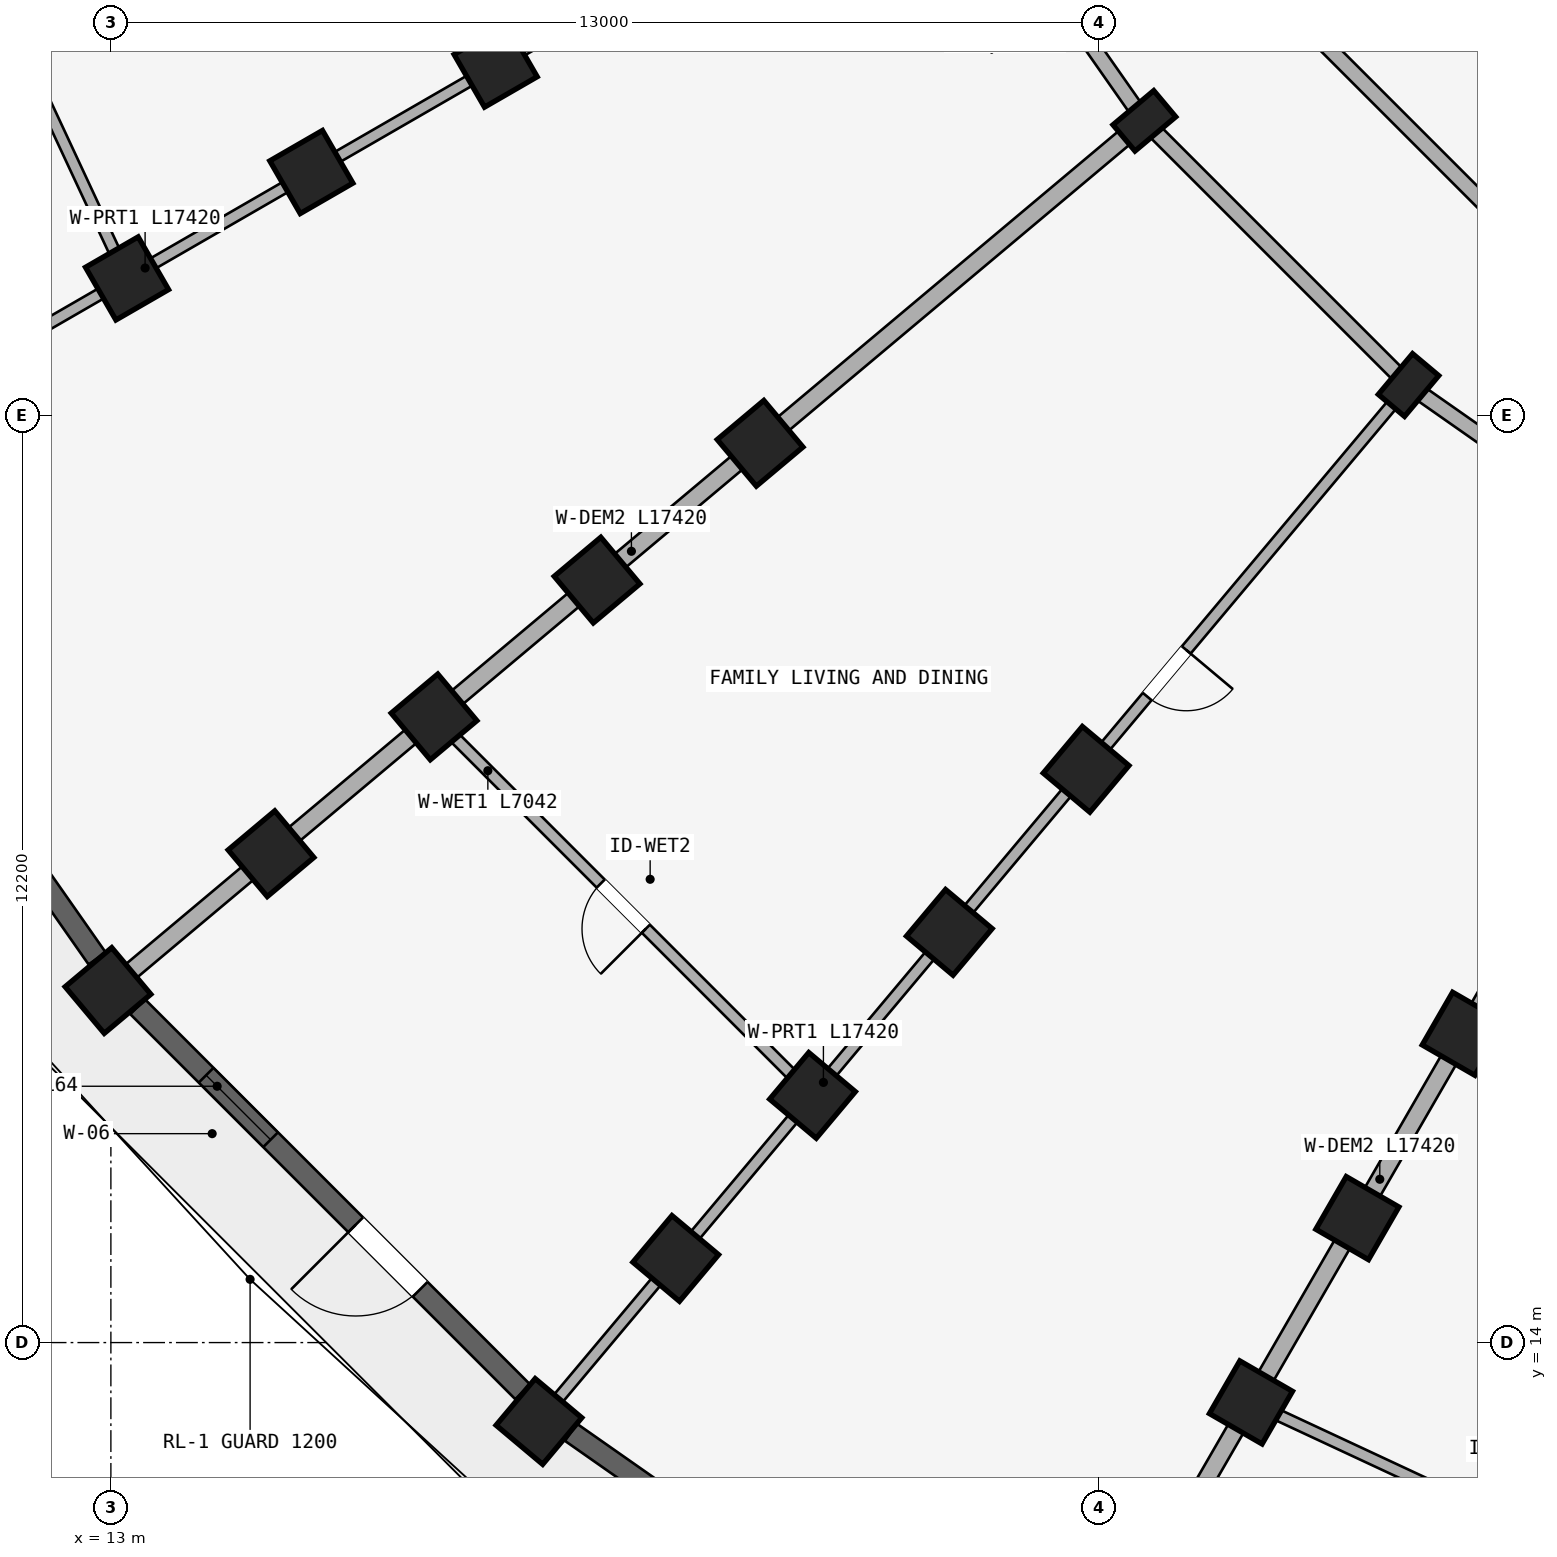
"""IFC4 building model, lengths in metres.
Left out: names, types, materials, properties, quantities, classifications, styles, units other than length and angle.
Written with IfcOpenShell. Run it as: python <this file> out.ifc"""

import sys

from ifc_helpers import new_model, si_unit, direction, frame, frame_2d, origin, origin_2d, place, context, subcontext, project, spatial, rectangle, extrude, element, fill, save


model = new_model("IFC4")
c1 = context("Model", 3, precision=1e-05, world=origin(), true_north=direction((0.0, 1.0)))
c2 = subcontext(c1, "Body", "Model", "MODEL_VIEW")
j1 = project(units=[si_unit("LENGTHUNIT", "METRE"), si_unit("PLANEANGLEUNIT", "RADIAN")], contexts=[c1])
p1 = place(None, origin())
s1 = spatial("IfcSite", under=j1, at=p1, CompositionType="ELEMENT")
p2 = place(p1, origin())
s2 = spatial("IfcBuilding", under=s1, at=p2, CompositionType="ELEMENT")
p3 = place(p2, frame((0.0, 0.0, 11.85)))
s3 = spatial("IfcBuildingStorey", under=s2, at=p3, CompositionType="ELEMENT", Elevation=11.85)
for number, where, z_axis, x_axis in (
    (1, (30.8, 18.062, 0.0), (0.0, 0.0, 1.0), (-0.866, 0.5, 0.0)),
    (2, (29.4, 15.637, 0.0), (0.0, 0.0, 1.0), (-0.866, 0.5, 0.0)),
    (3, (28.0, 13.213, 0.0), (0.0, 0.0, 1.0), (-0.866, 0.5, 0.0)),
):
    element("IfcColumn", number, at=place(p3, frame(where, z_axis=z_axis, x_axis=x_axis)), inside=s3, PredefinedType="COLUMN", context=c2, shape_type="SweptSolid", body=[
        extrude(rectangle(XDim=0.8, YDim=0.8, at=origin_2d()), origin(), (0.0, 0.0, 1.0), 2.93),
    ])
p4 = place(p3, frame((30.073, 26.598, 0.0), z_axis=(0.0, 0.0, 1.0), x_axis=(-0.766044443119, 0.642787609687, 0.0)))
e4 = element("IfcColumn", 4, at=p4, inside=s3, PredefinedType="COLUMN", context=c2, shape_type="SweptSolid", body=[
    extrude(rectangle(XDim=0.45, YDim=0.7, at=origin_2d()), origin(), (0.0, 0.0, 1.0), 2.93),
])
for number, where, z_axis, x_axis in (
    (5, (25.831, 21.542, 0.0), (0.0, 0.0, 1.0), (-0.766, 0.643, 0.0)),
    (6, (24.031, 19.397, 0.0), (0.0, 0.0, 1.0), (-0.766, 0.643, 0.0)),
    (7, (22.231, 17.252, 0.0), (0.0, 0.0, 1.0), (-0.766, 0.643, 0.0)),
    (8, (20.432, 15.107, 0.0), (0.0, 0.0, 1.0), (-0.766, 0.643, 0.0)),
    (9, (18.632, 12.962, 0.0), (0.0, 0.0, 1.0), (-0.766, 0.643, 0.0)),
):
    element("IfcColumn", number, at=place(p3, frame(where, z_axis=z_axis, x_axis=x_axis)), inside=s3, PredefinedType="COLUMN", context=c2, shape_type="SweptSolid", body=[
        extrude(rectangle(XDim=0.8, YDim=0.8, at=origin_2d()), origin(), (0.0, 0.0, 1.0), 2.93),
    ])
p5 = place(p3, frame((26.598, 30.073, 0.0), z_axis=(0.0, 0.0, 1.0), x_axis=(-0.642787609687, 0.766044443119, 0.0)))
e10 = element("IfcColumn", 10, at=p5, inside=s3, PredefinedType="COLUMN", context=c2, shape_type="SweptSolid", body=[
    extrude(rectangle(XDim=0.45, YDim=0.7, at=origin_2d()), origin(), (0.0, 0.0, 1.0), 2.93),
])
for number, where, z_axis, x_axis in (
    (11, (21.542, 25.831, 0.0), (0.0, 0.0, 1.0), (-0.643, 0.766, 0.0)),
    (12, (19.397, 24.031, 0.0), (0.0, 0.0, 1.0), (-0.643, 0.766, 0.0)),
    (13, (17.252, 22.231, 0.0), (0.0, 0.0, 1.0), (-0.643, 0.766, 0.0)),
    (14, (15.107, 20.432, 0.0), (0.0, 0.0, 1.0), (-0.643, 0.766, 0.0)),
    (15, (12.962, 18.632, 0.0), (0.0, 0.0, 1.0), (-0.643, 0.766, 0.0)),
    (16, (18.062, 30.8, 0.0), (0.0, 0.0, 1.0), (-0.5, 0.866, 0.0)),
    (17, (15.637, 29.4, 0.0), (0.0, 0.0, 1.0), (-0.5, 0.866, 0.0)),
    (18, (13.213, 28.0, 0.0), (0.0, 0.0, 1.0), (-0.5, 0.866, 0.0)),
):
    element("IfcColumn", number, at=place(p3, frame(where, z_axis=z_axis, x_axis=x_axis)), inside=s3, PredefinedType="COLUMN", context=c2, shape_type="SweptSolid", body=[
        extrude(rectangle(XDim=0.8, YDim=0.8, at=origin_2d()), origin(), (0.0, 0.0, 1.0), 2.93),
    ])
p6 = place(p3, frame((34.1, 23.778, 0.0), z_axis=(0.0, 0.0, 1.0), x_axis=(-0.819140911474, 0.573592335331, 0.0)))
e19 = element("IfcWall", 19, at=p6, inside=s3, PredefinedType="STANDARD", context=c2, shape_type="SweptSolid", body=[
    extrude(rectangle(XDim=4.916, YDim=0.2, at=frame_2d((2.458, 0.0))), origin(), (0.0, 0.0, 1.0), 2.372),
])
p7 = place(p6, frame((1.918, 0.0, 0.0)))
e20 = element("IfcOpeningElement", 20, at=p7, cuts=e19, PredefinedType="OPENING", context=c2, shape_type="SweptSolid", body=[
    extrude(rectangle(XDim=1.08, YDim=2.15, at=frame_2d((0.54, 1.075))), frame((0.0, 0.11, 0.0), z_axis=(0.0, -1.0, 0.0), x_axis=(1.0, 0.0, 0.0)), (0.0, 0.0, 1.0), 0.22),
])
p8 = place(p3, frame((31.616, 28.436, 0.0), z_axis=(0.0, 0.0, 1.0), x_axis=(-0.707106781187, 0.707106781187, 0.0)))
e21 = element("IfcWall", 21, at=p8, inside=s3, PredefinedType="STANDARD", context=c2, shape_type="SweptSolid", body=[
    extrude(rectangle(XDim=4.497, YDim=0.2, at=frame_2d((2.249, 0.0))), origin(), (0.0, 0.0, 1.0), 2.372),
])
p9 = place(p3, frame((30.073, 26.598, 0.0), z_axis=(0.0, 0.0, 1.0), x_axis=(-0.707106781187, 0.707106781187, 0.0)))
e22 = element("IfcWall", 22, at=p9, inside=s3, PredefinedType="STANDARD", context=c2, shape_type="SweptSolid", body=[
    extrude(rectangle(XDim=4.916, YDim=0.2, at=frame_2d((2.458, 0.0))), origin(), (0.0, 0.0, 1.0), 2.372),
])
p10 = place(p3, frame((26.598, 30.073, 0.0), z_axis=(0.0, 0.0, 1.0), x_axis=(-0.573592335331, 0.819140911474, 0.0)))
e23 = element("IfcWall", 23, at=p10, inside=s3, PredefinedType="STANDARD", context=c2, shape_type="SweptSolid", body=[
    extrude(rectangle(XDim=4.916, YDim=0.2, at=frame_2d((2.458, 0.0))), origin(), (0.0, 0.0, 1.0), 2.372),
])
p11 = place(p10, frame((1.888, 0.0, 0.0)))
e24 = element("IfcOpeningElement", 24, at=p11, cuts=e23, PredefinedType="OPENING", context=c2, shape_type="SweptSolid", body=[
    extrude(rectangle(XDim=1.14, YDim=2.15, at=frame_2d((0.57, 1.075))), frame((0.0, 0.11, 0.0), z_axis=(0.0, -1.0, 0.0), x_axis=(1.0, 0.0, 0.0)), (0.0, 0.0, 1.0), 0.22),
])
p12 = place(p3, frame((34.05, 23.691, 0.0), z_axis=(0.0, 0.0, 1.0), x_axis=(-0.499997843263, -0.866026648973, 0.0)))
e25 = element("IfcWall", 25, at=p12, inside=s3, PredefinedType="STANDARD", context=c2, shape_type="SweptSolid", body=[
    extrude(rectangle(XDim=17.42, YDim=0.23, at=frame_2d((8.71, 0.0))), origin(), (0.0, 0.0, 1.0), 2.372),
])
p13 = place(p3, frame((30.009, 26.521, 0.0), z_axis=(0.0, 0.0, 1.0), x_axis=(-0.642784757967, -0.766046835987, 0.0)))
e26 = element("IfcWall", 26, at=p13, inside=s3, PredefinedType="PARTITIONING", context=c2, shape_type="SweptSolid", body=[
    extrude(rectangle(XDim=17.42, YDim=0.15, at=frame_2d((8.71, 0.0))), origin(), (0.0, 0.0, 1.0), 2.372),
])
p14 = place(p13, frame((4.45, 0.0, 0.0)))
e27 = element("IfcOpeningElement", 27, at=p14, cuts=e26, PredefinedType="OPENING", context=c2, shape_type="SweptSolid", body=[
    extrude(rectangle(XDim=0.8, YDim=2.1, at=frame_2d((0.4, 1.05))), frame((0.0, 0.085, 0.0), z_axis=(0.0, -1.0, 0.0), x_axis=(1.0, 0.0, 0.0)), (0.0, 0.0, 1.0), 0.17),
])
p15 = place(p3, frame((26.521, 30.009, 0.0), z_axis=(0.0, 0.0, 1.0), x_axis=(-0.766046835987, -0.642784757967, 0.0)))
e28 = element("IfcWall", 28, at=p15, inside=s3, PredefinedType="STANDARD", context=c2, shape_type="SweptSolid", body=[
    extrude(rectangle(XDim=17.42, YDim=0.23, at=frame_2d((8.71, 0.0))), origin(), (0.0, 0.0, 1.0), 2.372),
])
p16 = place(p3, frame((23.691, 34.05, 0.0), z_axis=(0.0, 0.0, 1.0), x_axis=(-0.866026648973, -0.499997843263, 0.0)))
e29 = element("IfcWall", 29, at=p16, inside=s3, PredefinedType="PARTITIONING", context=c2, shape_type="SweptSolid", body=[
    extrude(rectangle(XDim=17.42, YDim=0.15, at=frame_2d((8.71, 0.0))), origin(), (0.0, 0.0, 1.0), 2.372),
])
p17 = place(p16, frame((4.45, 0.0, 0.0)))
e30 = element("IfcOpeningElement", 30, at=p17, cuts=e29, PredefinedType="OPENING", context=c2, shape_type="SweptSolid", body=[
    extrude(rectangle(XDim=0.8, YDim=2.1, at=frame_2d((0.4, 1.05))), frame((0.0, 0.085, 0.0), z_axis=(0.0, -1.0, 0.0), x_axis=(1.0, 0.0, 0.0)), (0.0, 0.0, 1.0), 0.17),
])
p18 = place(p3, frame((34.382, 10.236, 0.0), z_axis=(0.0, 0.0, 1.0), x_axis=(-0.906297360311, 0.422640621205, 0.0)))
e31 = element("IfcWall", 31, at=p18, inside=s3, PredefinedType="PLUMBINGWALL", context=c2, shape_type="SweptSolid", body=[
    extrude(rectangle(XDim=7.042, YDim=0.15, at=frame_2d((3.521, 0.0))), origin(), (0.0, 0.0, 1.0), 2.372),
])
p19 = place(p18, frame((3.141, 0.0, 0.0)))
e32 = element("IfcOpeningElement", 32, at=p19, cuts=e31, PredefinedType="OPENING", context=c2, shape_type="SweptSolid", body=[
    extrude(rectangle(XDim=0.76, YDim=2.05, at=frame_2d((0.38, 1.025))), frame((0.0, 0.085, 0.0), z_axis=(0.0, -1.0, 0.0), x_axis=(1.0, 0.0, 0.0)), (0.0, 0.0, 1.0), 0.17),
])
p20 = place(p3, frame((22.231, 17.252, 0.0), z_axis=(0.0, 0.0, 1.0), x_axis=(-0.707106781187, 0.707106781187, 0.0)))
e33 = element("IfcWall", 33, at=p20, inside=s3, PredefinedType="PLUMBINGWALL", context=c2, shape_type="SweptSolid", body=[
    extrude(rectangle(XDim=7.042, YDim=0.15, at=frame_2d((3.521, 0.0))), origin(), (0.0, 0.0, 1.0), 2.372),
])
p21 = place(p20, frame((3.101, 0.0, 0.0)))
e34 = element("IfcOpeningElement", 34, at=p21, cuts=e33, PredefinedType="OPENING", context=c2, shape_type="SweptSolid", body=[
    extrude(rectangle(XDim=0.84, YDim=2.1, at=frame_2d((0.42, 1.05))), frame((0.0, 0.085, 0.0), z_axis=(0.0, -1.0, 0.0), x_axis=(1.0, 0.0, 0.0)), (0.0, 0.0, 1.0), 0.17),
])
p22 = place(p3, frame((13.213, 28.0, 0.0), z_axis=(0.0, 0.0, 1.0), x_axis=(-0.422640621205, 0.906297360311, 0.0)))
e35 = element("IfcWall", 35, at=p22, inside=s3, PredefinedType="PLUMBINGWALL", context=c2, shape_type="SweptSolid", body=[
    extrude(rectangle(XDim=7.042, YDim=0.15, at=frame_2d((3.521, 0.0))), origin(), (0.0, 0.0, 1.0), 2.372),
])
p23 = place(p22, frame((3.121, 0.0, 0.0)))
e36 = element("IfcOpeningElement", 36, at=p23, cuts=e35, PredefinedType="OPENING", context=c2, shape_type="SweptSolid", body=[
    extrude(rectangle(XDim=0.8, YDim=2.1, at=frame_2d((0.4, 1.05))), frame((0.0, 0.085, 0.0), z_axis=(0.0, -1.0, 0.0), x_axis=(1.0, 0.0, 0.0)), (0.0, 0.0, 1.0), 0.17),
])
p24 = place(p3, frame((24.922, 8.71, 0.0), z_axis=(0.0, 0.0, 1.0), x_axis=(-0.819161471697, 0.573562972382, 0.0)))
e37 = element("IfcWall", 37, at=p24, inside=s3, PredefinedType="STANDARD", context=c2, shape_type="SweptSolid", body=[
    extrude(rectangle(XDim=7.164, YDim=0.275, at=frame_2d((3.582, 0.0))), origin(), (0.0, 0.0, 1.0), 2.372),
])
p25 = place(p24, frame((2.607, 0.0, 0.322)))
e38 = element("IfcOpeningElement", 38, at=p25, cuts=e37, PredefinedType="OPENING", context=c2, shape_type="SweptSolid", body=[
    extrude(rectangle(XDim=1.95, YDim=1.85, at=frame_2d((0.975, 0.925))), frame((0.0, 0.147, 0.0), z_axis=(0.0, -1.0, 0.0), x_axis=(1.0, 0.0, 0.0)), (0.0, 0.0, 1.0), 0.295),
])
p26 = place(p3, frame((18.418, 13.352, 0.0), z_axis=(0.0, 0.0, 1.0), x_axis=(-0.707106781187, 0.707106781187, 0.0)))
e39 = element("IfcWall", 39, at=p26, inside=s3, PredefinedType="STANDARD", context=c2, shape_type="SweptSolid", body=[
    extrude(rectangle(XDim=7.164, YDim=0.275, at=frame_2d((3.582, 0.0))), origin(), (0.0, 0.0, 1.0), 2.372),
])
p27 = place(p26, frame((4.69, 0.0, 0.522)))
e40 = element("IfcOpeningElement", 40, at=p27, cuts=e39, PredefinedType="OPENING", context=c2, shape_type="SweptSolid", body=[
    extrude(rectangle(XDim=1.2, YDim=1.5, at=frame_2d((0.6, 0.75))), frame((0.0, 0.147, 0.0), z_axis=(0.0, -1.0, 0.0), x_axis=(1.0, 0.0, 0.0)), (0.0, 0.0, 1.0), 0.295),
])
p28 = place(p26, frame((1.907, 0.0, 0.0)))
e41 = element("IfcOpeningElement", 41, at=p28, cuts=e39, PredefinedType="OPENING", context=c2, shape_type="SweptSolid", body=[
    extrude(rectangle(XDim=1.2, YDim=2.15, at=frame_2d((0.6, 1.075))), frame((0.0, 0.147, 0.0), z_axis=(0.0, -1.0, 0.0), x_axis=(1.0, 0.0, 0.0)), (0.0, 0.0, 1.0), 0.295),
])
p29 = place(p3, frame((12.819, 19.053, 0.0), z_axis=(0.0, 0.0, 1.0), x_axis=(-0.573562972382, 0.819161471697, 0.0)))
e42 = element("IfcWall", 42, at=p29, inside=s3, PredefinedType="STANDARD", context=c2, shape_type="SweptSolid", body=[
    extrude(rectangle(XDim=7.164, YDim=0.275, at=frame_2d((3.582, 0.0))), origin(), (0.0, 0.0, 1.0), 2.372),
])
p30 = place(p29, frame((2.757, 0.0, 0.422)))
e43 = element("IfcOpeningElement", 43, at=p30, cuts=e42, PredefinedType="OPENING", context=c2, shape_type="SweptSolid", body=[
    extrude(rectangle(XDim=1.65, YDim=1.75, at=frame_2d((0.825, 0.875))), frame((0.0, 0.147, 0.0), z_axis=(0.0, -1.0, 0.0), x_axis=(1.0, 0.0, 0.0)), (0.0, 0.0, 1.0), 0.295),
])
p31 = place(p27, origin())
e44 = element("IfcWindow", 44, at=p31, inside=s3, PartitioningType="SINGLE_PANEL", PredefinedType="WINDOW", context=c2, shape_type="SweptSolid", body=[
    extrude(rectangle(XDim=1.2, YDim=1.5, at=frame_2d((0.6, 0.75))), frame((0.0, 0.03, 0.0), z_axis=(0.0, -1.0, 0.0), x_axis=(1.0, 0.0, 0.0)), (0.0, 0.0, 1.0), 0.06),
])
fill(e40, e44)
p32 = place(p14, frame((0.8, 0.0, 0.0), z_axis=(0.0, 0.0, 1.0), x_axis=(-1.0, 0.0, 0.0)))
e45 = element("IfcDoor", 45, at=p32, inside=s3, OperationType="SINGLE_SWING_RIGHT", PredefinedType="DOOR", context=c2, shape_type="SweptSolid", body=[
    extrude(rectangle(XDim=0.8, YDim=2.1, at=frame_2d((0.4, 1.05))), frame((0.0, 0.025, 0.0), z_axis=(0.0, -1.0, 0.0), x_axis=(1.0, 0.0, 0.0)), (0.0, 0.0, 1.0), 0.05),
])
fill(e27, e45)
p33 = place(p21, origin())
e46 = element("IfcDoor", 46, at=p33, inside=s3, OperationType="SINGLE_SWING_LEFT", PredefinedType="DOOR", context=c2, shape_type="SweptSolid", body=[
    extrude(rectangle(XDim=0.84, YDim=2.1, at=frame_2d((0.42, 1.05))), frame((0.0, 0.025, 0.0), z_axis=(0.0, -1.0, 0.0), x_axis=(1.0, 0.0, 0.0)), (0.0, 0.0, 1.0), 0.05),
])
fill(e34, e46)
p34 = place(p28, origin())
e47 = element("IfcDoor", 47, at=p34, inside=s3, OperationType="SINGLE_SWING_RIGHT", PredefinedType="DOOR", context=c2, shape_type="SweptSolid", body=[
    extrude(rectangle(XDim=1.2, YDim=2.15, at=frame_2d((0.6, 1.075))), frame((0.0, 0.025, 0.0), z_axis=(0.0, -1.0, 0.0), x_axis=(1.0, 0.0, 0.0)), (0.0, 0.0, 1.0), 0.05),
])
fill(e41, e47)
save(model, sys.argv[1])
